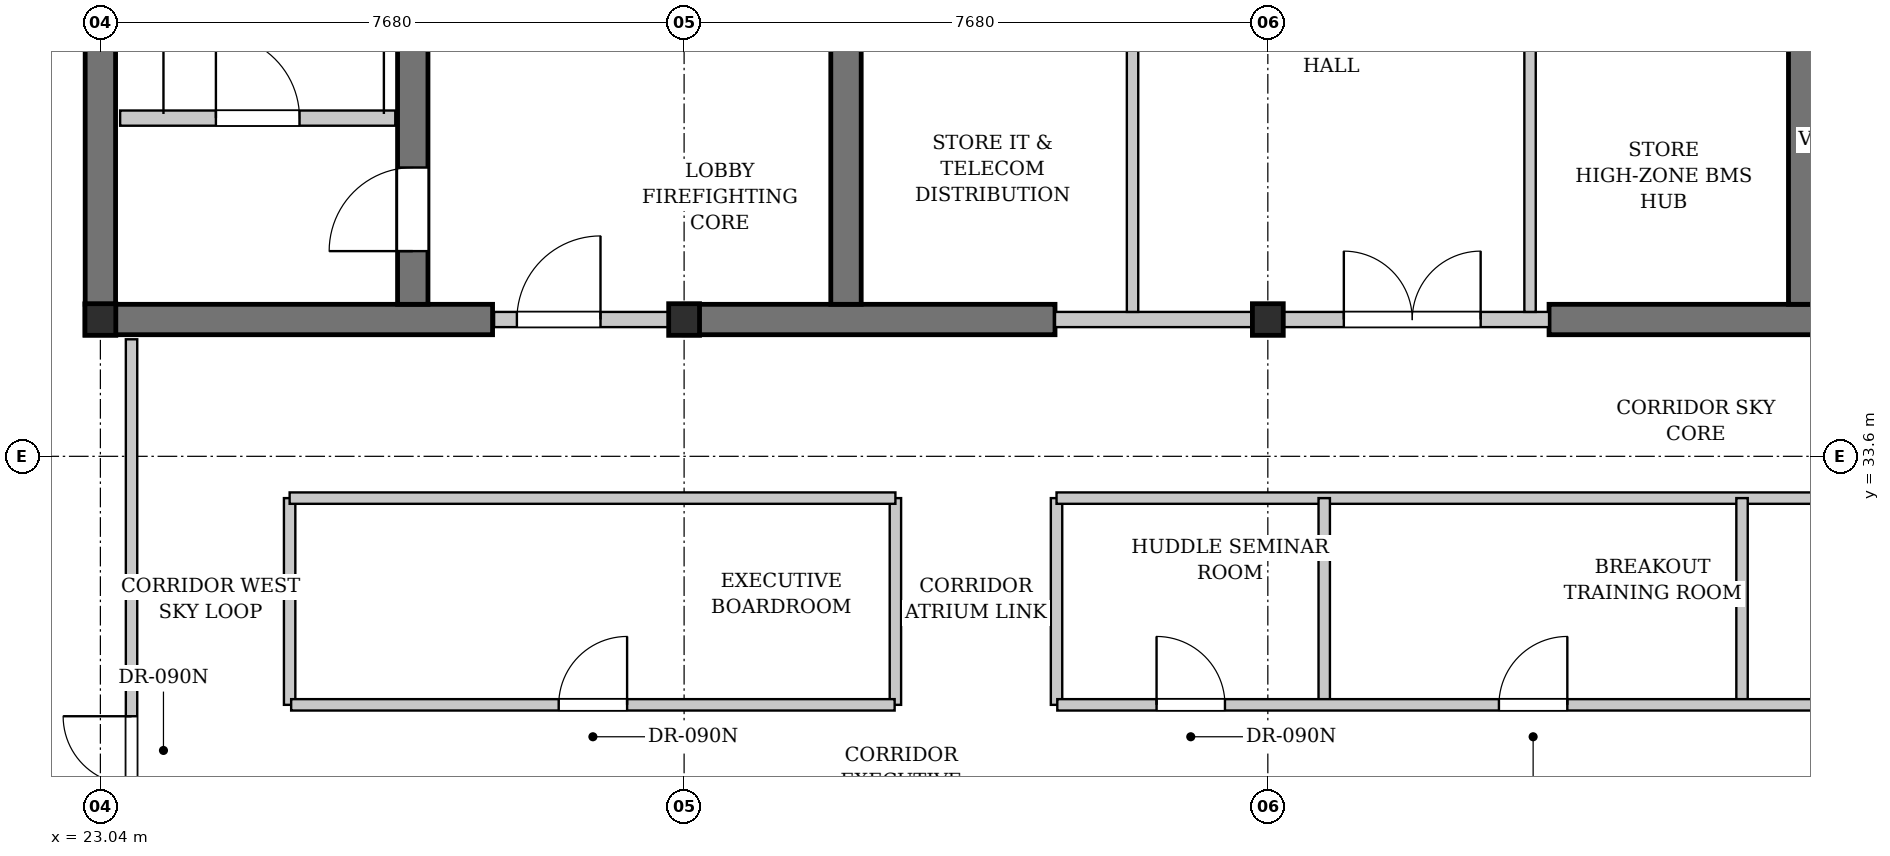
"""IFC4 building model, lengths in metres.
Left out: names, types, materials, properties, quantities, classifications, styles, units other than length and angle.
Written with IfcOpenShell. Run it as: python <this file> out.ifc"""

import sys

from ifc_helpers import new_model, si_unit, direction, frame, frame_2d, origin, origin_2d, place, context, subcontext, project, spatial, rectangle, i_section, extrude, element, fill, save


model = new_model("IFC4")
c1 = context("Model", 3, precision=1e-05, world=origin(), true_north=direction((0.0, 1.0)))
c2 = subcontext(c1, "Body", "Model", "MODEL_VIEW")
j1 = project(units=[si_unit("LENGTHUNIT", "METRE"), si_unit("PLANEANGLEUNIT", "RADIAN")], contexts=[c1])
p1 = place(None, origin())
s1 = spatial("IfcSite", under=j1, at=p1, CompositionType="ELEMENT")
p2 = place(p1, origin())
s2 = spatial("IfcBuilding", under=s1, at=p2, CompositionType="ELEMENT")
p3 = place(p2, frame((0.0, 0.0, 265.9)))
s3 = spatial("IfcBuildingStorey", under=s2, at=p3, CompositionType="ELEMENT", Elevation=265.9)
p4 = place(p3, frame((22.84, 35.4, 0.0), z_axis=(0.0, 0.0, 1.0), x_axis=(1.0, 0.0, 0.0)))
e1 = element("IfcWall", 1, at=p4, inside=s3, PredefinedType="SHEAR", context=c2, shape_type="SweptSolid", body=[
    extrude(rectangle(XDim=5.36, YDim=0.4, at=frame_2d((2.68, 0.0))), origin(), (0.0, 0.0, 1.0), 3.18),
])
p5 = place(p3, frame((30.72, 35.4, 0.0), z_axis=(0.0, 0.0, 1.0), x_axis=(1.0, 0.0, 0.0)))
e2 = element("IfcWall", 2, at=p5, inside=s3, PredefinedType="SHEAR", context=c2, shape_type="SweptSolid", body=[
    extrude(rectangle(XDim=4.88, YDim=0.4, at=frame_2d((2.44, 0.0))), origin(), (0.0, 0.0, 1.0), 3.18),
])
p6 = place(p3, frame((42.1, 35.4, 0.0), z_axis=(0.0, 0.0, 1.0), x_axis=(1.0, 0.0, 0.0)))
e3 = element("IfcWall", 3, at=p6, inside=s3, PredefinedType="SHEAR", context=c2, shape_type="SweptSolid", body=[
    extrude(rectangle(XDim=8.05, YDim=0.4, at=frame_2d((4.025, 0.0))), origin(), (0.0, 0.0, 1.0), 3.18),
])
p7 = place(p6, frame((4.85, 0.0, 0.0)))
e4 = element("IfcOpeningElement", 4, at=p7, cuts=e3, PredefinedType="OPENING", context=c2, shape_type="SweptSolid", body=[
    extrude(rectangle(XDim=0.9, YDim=2.15, at=frame_2d((0.45, 1.075))), frame((0.0, 0.21, 0.0), z_axis=(0.0, -1.0, 0.0), x_axis=(1.0, 0.0, 0.0)), (0.0, 0.0, 1.0), 0.42),
])
p8 = place(p3, frame((23.04, 35.6, 0.0), z_axis=(0.0, 0.0, 1.0), x_axis=(0.0, 1.0, 0.0)))
e5 = element("IfcWall", 5, at=p8, inside=s3, PredefinedType="SHEAR", context=c2, shape_type="SweptSolid", body=[
    extrude(rectangle(XDim=10.4, YDim=0.4, at=frame_2d((5.2, 0.0))), origin(), (0.0, 0.0, 1.0), 3.18),
])
p9 = place(p3, frame((27.15, 35.6, 0.0), z_axis=(0.0, 0.0, 1.0), x_axis=(0.0, 1.0, 0.0)))
e6 = element("IfcWall", 6, at=p9, inside=s3, PredefinedType="SHEAR", context=c2, shape_type="SweptSolid", body=[
    extrude(rectangle(XDim=10.4, YDim=0.4, at=frame_2d((5.2, 0.0))), origin(), (0.0, 0.0, 1.0), 3.18),
])
p10 = place(p9, frame((0.7, 0.0, 0.0)))
e7 = element("IfcOpeningElement", 7, at=p10, cuts=e6, PredefinedType="OPENING", context=c2, shape_type="SweptSolid", body=[
    extrude(rectangle(XDim=1.1, YDim=2.15, at=frame_2d((0.55, 1.075))), frame((0.0, 0.21, 0.0), z_axis=(0.0, -1.0, 0.0), x_axis=(1.0, 0.0, 0.0)), (0.0, 0.0, 1.0), 0.42),
])
for number, where, z_axis, x_axis in (
    (8, (32.85, 35.6, 0.0), (0.0, 0.0, 1.0), (0.0, 1.0, 0.0)),
    (9, (45.45, 35.6, 0.0), (0.0, 0.0, 1.0), (0.0, 1.0, 0.0)),
):
    element("IfcWall", number, at=place(p3, frame(where, z_axis=z_axis, x_axis=x_axis)), inside=s3, PredefinedType="SHEAR", context=c2, shape_type="SweptSolid", body=[
        extrude(rectangle(XDim=10.4, YDim=0.4, at=frame_2d((5.2, 0.0))), origin(), (0.0, 0.0, 1.0), 3.18),
    ])
for number, where, z_axis, x_axis in (
    (10, (23.04, 35.4, 0.0), (0.0, 0.0, 1.0), (1.0, 0.0, 0.0)),
    (11, (30.72, 35.4, 0.0), (0.0, 0.0, 1.0), (1.0, 0.0, 0.0)),
    (12, (38.4, 35.4, 0.0), (0.0, 0.0, 1.0), (1.0, 0.0, 0.0)),
):
    element("IfcColumn", number, at=place(p3, frame(where, z_axis=z_axis, x_axis=x_axis)), inside=s3, PredefinedType="COLUMN", context=c2, shape_type="SweptSolid", body=[
        extrude(i_section(OverallWidth=0.406, OverallDepth=0.416, WebThickness=0.03, FlangeThickness=0.048, FilletRadius=0.015, at=origin_2d()), origin(), (0.0, 0.0, 1.0), 3.4),
    ])
p11 = place(p3, frame((23.3, 38.05, 0.0), z_axis=(0.0, 0.0, 1.0), x_axis=(1.0, 0.0, 0.0)))
e13 = element("IfcWall", 13, at=p11, inside=s3, PredefinedType="PARTITIONING", context=c2, shape_type="SweptSolid", body=[
    extrude(rectangle(XDim=3.62, YDim=0.2, at=frame_2d((1.81, 0.0))), origin(), (0.0, 0.0, 1.0), 3.18),
])
p12 = place(p11, frame((1.26, 0.0, 0.0)))
e14 = element("IfcOpeningElement", 14, at=p12, cuts=e13, PredefinedType="OPENING", context=c2, shape_type="SweptSolid", body=[
    extrude(rectangle(XDim=1.1, YDim=2.15, at=frame_2d((0.55, 1.075))), frame((0.0, 0.11, 0.0), z_axis=(0.0, -1.0, 0.0), x_axis=(1.0, 0.0, 0.0)), (0.0, 0.0, 1.0), 0.22),
])
p13 = place(p3, frame((28.22, 35.4, 0.0), z_axis=(0.0, 0.0, 1.0), x_axis=(1.0, 0.0, 0.0)))
e15 = element("IfcWall", 15, at=p13, inside=s3, PredefinedType="PARTITIONING", context=c2, shape_type="SweptSolid", body=[
    extrude(rectangle(XDim=2.5, YDim=0.2, at=frame_2d((1.25, 0.0))), origin(), (0.0, 0.0, 1.0), 2.575),
])
p14 = place(p13, frame((0.3, 0.0, 0.0)))
e16 = element("IfcOpeningElement", 16, at=p14, cuts=e15, PredefinedType="OPENING", context=c2, shape_type="SweptSolid", body=[
    extrude(rectangle(XDim=1.1, YDim=2.15, at=frame_2d((0.55, 1.075))), frame((0.0, 0.11, 0.0), z_axis=(0.0, -1.0, 0.0), x_axis=(1.0, 0.0, 0.0)), (0.0, 0.0, 1.0), 0.22),
])
p15 = place(p3, frame((35.6, 35.4, 0.0), z_axis=(0.0, 0.0, 1.0), x_axis=(1.0, 0.0, 0.0)))
e17 = element("IfcWall", 17, at=p15, inside=s3, PredefinedType="PARTITIONING", context=c2, shape_type="SweptSolid", body=[
    extrude(rectangle(XDim=6.5, YDim=0.2, at=frame_2d((3.25, 0.0))), origin(), (0.0, 0.0, 1.0), 2.575),
])
p16 = place(p15, frame((3.8, 0.0, 0.0)))
e18 = element("IfcOpeningElement", 18, at=p16, cuts=e17, PredefinedType="OPENING", context=c2, shape_type="SweptSolid", body=[
    extrude(rectangle(XDim=1.8, YDim=2.3, at=frame_2d((0.9, 1.15))), frame((0.0, 0.11, 0.0), z_axis=(0.0, -1.0, 0.0), x_axis=(1.0, 0.0, 0.0)), (0.0, 0.0, 1.0), 0.22),
])
p17 = place(p3, frame((36.62, 35.5, 0.0), z_axis=(0.0, 0.0, 1.0), x_axis=(0.0, 1.0, 0.0)))
e19 = element("IfcWall", 19, at=p17, inside=s3, PredefinedType="PARTITIONING", context=c2, shape_type="SweptSolid", body=[
    extrude(rectangle(XDim=10.42, YDim=0.15, at=frame_2d((5.21, 0.0))), origin(), (0.0, 0.0, 1.0), 3.18),
])
p18 = place(p17, frame((3.92, 0.0, 0.0)))
e20 = element("IfcOpeningElement", 20, at=p18, cuts=e19, PredefinedType="OPENING", context=c2, shape_type="SweptSolid", body=[
    extrude(rectangle(XDim=0.9, YDim=2.15, at=frame_2d((0.45, 1.075))), frame((0.0, 0.085, 0.0), z_axis=(0.0, -1.0, 0.0), x_axis=(1.0, 0.0, 0.0)), (0.0, 0.0, 1.0), 0.17),
])
p19 = place(p17, frame((5.85, 0.0, 0.0)))
e21 = element("IfcOpeningElement", 21, at=p19, cuts=e19, PredefinedType="OPENING", context=c2, shape_type="SweptSolid", body=[
    extrude(rectangle(XDim=0.9, YDim=2.15, at=frame_2d((0.45, 1.075))), frame((0.0, 0.085, 0.0), z_axis=(0.0, -1.0, 0.0), x_axis=(1.0, 0.0, 0.0)), (0.0, 0.0, 1.0), 0.17),
])
p20 = place(p3, frame((41.85, 35.5, 0.0), z_axis=(0.0, 0.0, 1.0), x_axis=(0.0, 1.0, 0.0)))
e22 = element("IfcWall", 22, at=p20, inside=s3, PredefinedType="PARTITIONING", context=c2, shape_type="SweptSolid", body=[
    extrude(rectangle(XDim=10.42, YDim=0.15, at=frame_2d((5.21, 0.0))), origin(), (0.0, 0.0, 1.0), 3.18),
])
p21 = place(p20, frame((3.92, 0.0, 0.0)))
e23 = element("IfcOpeningElement", 23, at=p21, cuts=e22, PredefinedType="OPENING", context=c2, shape_type="SweptSolid", body=[
    extrude(rectangle(XDim=0.9, YDim=2.15, at=frame_2d((0.45, 1.075))), frame((0.0, 0.085, 0.0), z_axis=(0.0, -1.0, 0.0), x_axis=(1.0, 0.0, 0.0)), (0.0, 0.0, 1.0), 0.17),
])
p22 = place(p20, frame((5.85, 0.0, 0.0)))
e24 = element("IfcOpeningElement", 24, at=p22, cuts=e22, PredefinedType="OPENING", context=c2, shape_type="SweptSolid", body=[
    extrude(rectangle(XDim=0.9, YDim=2.15, at=frame_2d((0.45, 1.075))), frame((0.0, 0.085, 0.0), z_axis=(0.0, -1.0, 0.0), x_axis=(1.0, 0.0, 0.0)), (0.0, 0.0, 1.0), 0.17),
])
p23 = place(p3, frame((23.45, 28.25, 0.0), z_axis=(0.0, 0.0, 1.0), x_axis=(0.0, 1.0, 0.0)))
e25 = element("IfcWall", 25, at=p23, inside=s3, PredefinedType="PARTITIONING", context=c2, shape_type="SweptSolid", body=[
    extrude(rectangle(XDim=6.89, YDim=0.15, at=frame_2d((3.445, 0.0))), origin(), (0.0, 0.0, 1.0), 3.18),
])
p24 = place(p23, frame((1.03, 0.0, 0.0)))
e26 = element("IfcOpeningElement", 26, at=p24, cuts=e25, PredefinedType="OPENING", context=c2, shape_type="SweptSolid", body=[
    extrude(rectangle(XDim=0.9, YDim=2.15, at=frame_2d((0.45, 1.075))), frame((0.0, 0.085, 0.0), z_axis=(0.0, -1.0, 0.0), x_axis=(1.0, 0.0, 0.0)), (0.0, 0.0, 1.0), 0.17),
])
for number, where, z_axis, x_axis in (
    (27, (25.53, 30.33, 0.0), (0.0, 0.0, 1.0), (0.0, 1.0, 0.0)),
    (28, (33.5, 30.33, 0.0), (0.0, 0.0, 1.0), (0.0, 1.0, 0.0)),
    (29, (35.62, 30.33, 0.0), (0.0, 0.0, 1.0), (0.0, 1.0, 0.0)),
):
    element("IfcWall", number, at=place(p3, frame(where, z_axis=z_axis, x_axis=x_axis)), inside=s3, PredefinedType="PARTITIONING", context=c2, shape_type="SweptSolid", body=[
        extrude(rectangle(XDim=2.72, YDim=0.15, at=frame_2d((1.36, 0.0))), origin(), (0.0, 0.0, 1.0), 3.18),
    ])
p25 = place(p3, frame((25.53, 33.05, 0.0), z_axis=(0.0, 0.0, 1.0), x_axis=(1.0, 0.0, 0.0)))
e30 = element("IfcWall", 30, at=p25, inside=s3, PredefinedType="PARTITIONING", context=c2, shape_type="SweptSolid", body=[
    extrude(rectangle(XDim=7.97, YDim=0.15, at=frame_2d((3.985, 0.0))), origin(), (0.0, 0.0, 1.0), 3.18),
])
p26 = place(p3, frame((35.62, 33.05, 0.0), z_axis=(0.0, 0.0, 1.0), x_axis=(1.0, 0.0, 0.0)))
e31 = element("IfcWall", 31, at=p26, inside=s3, PredefinedType="PARTITIONING", context=c2, shape_type="SweptSolid", body=[
    extrude(rectangle(XDim=15.3, YDim=0.15, at=frame_2d((7.65, 0.0))), origin(), (0.0, 0.0, 1.0), 3.18),
])
p27 = place(p3, frame((25.55, 30.33, 0.0), z_axis=(0.0, 0.0, 1.0), x_axis=(1.0, 0.0, 0.0)))
e32 = element("IfcWall", 32, at=p27, inside=s3, PredefinedType="PARTITIONING", context=c2, shape_type="SweptSolid", body=[
    extrude(rectangle(XDim=7.94, YDim=0.15, at=frame_2d((3.97, 0.0))), origin(), (0.0, 0.0, 1.0), 3.18),
])
p28 = place(p27, frame((3.52, 0.0, 0.0)))
e33 = element("IfcOpeningElement", 33, at=p28, cuts=e32, PredefinedType="OPENING", context=c2, shape_type="SweptSolid", body=[
    extrude(rectangle(XDim=0.9, YDim=2.15, at=frame_2d((0.45, 1.075))), frame((0.0, 0.085, 0.0), z_axis=(0.0, -1.0, 0.0), x_axis=(1.0, 0.0, 0.0)), (0.0, 0.0, 1.0), 0.17),
])
for number, where, z_axis, x_axis in (
    (34, (39.142, 30.33, 0.0), (0.0, 0.0, 1.0), (0.0, 1.0, 0.0)),
    (35, (44.639, 30.33, 0.0), (0.0, 0.0, 1.0), (0.0, 1.0, 0.0)),
):
    element("IfcWall", number, at=place(p3, frame(where, z_axis=z_axis, x_axis=x_axis)), inside=s3, PredefinedType="PARTITIONING", context=c2, shape_type="SweptSolid", body=[
        extrude(rectangle(XDim=2.72, YDim=0.15, at=frame_2d((1.36, 0.0))), origin(), (0.0, 0.0, 1.0), 3.18),
    ])
p29 = place(p3, frame((35.63, 30.33, 0.0), z_axis=(0.0, 0.0, 1.0), x_axis=(1.0, 0.0, 0.0)))
e36 = element("IfcWall", 36, at=p29, inside=s3, PredefinedType="PARTITIONING", context=c2, shape_type="SweptSolid", body=[
    extrude(rectangle(XDim=15.27, YDim=0.15, at=frame_2d((7.635, 0.0))), origin(), (0.0, 0.0, 1.0), 3.18),
])
p30 = place(p29, frame((1.306, 0.0, 0.0)))
e37 = element("IfcOpeningElement", 37, at=p30, cuts=e36, PredefinedType="OPENING", context=c2, shape_type="SweptSolid", body=[
    extrude(rectangle(XDim=0.9, YDim=2.15, at=frame_2d((0.45, 1.075))), frame((0.0, 0.085, 0.0), z_axis=(0.0, -1.0, 0.0), x_axis=(1.0, 0.0, 0.0)), (0.0, 0.0, 1.0), 0.17),
])
p31 = place(p29, frame((5.811, 0.0, 0.0)))
e38 = element("IfcOpeningElement", 38, at=p31, cuts=e36, PredefinedType="OPENING", context=c2, shape_type="SweptSolid", body=[
    extrude(rectangle(XDim=0.9, YDim=2.15, at=frame_2d((0.45, 1.075))), frame((0.0, 0.085, 0.0), z_axis=(0.0, -1.0, 0.0), x_axis=(1.0, 0.0, 0.0)), (0.0, 0.0, 1.0), 0.17),
])
p32 = place(p29, frame((11.689, 0.0, 0.0)))
e39 = element("IfcOpeningElement", 39, at=p32, cuts=e36, PredefinedType="OPENING", context=c2, shape_type="SweptSolid", body=[
    extrude(rectangle(XDim=0.9, YDim=2.15, at=frame_2d((0.45, 1.075))), frame((0.0, 0.085, 0.0), z_axis=(0.0, -1.0, 0.0), x_axis=(1.0, 0.0, 0.0)), (0.0, 0.0, 1.0), 0.17),
])
p33 = place(p12, origin())
e40 = element("IfcDoor", 40, at=p33, inside=s3, OperationType="SINGLE_SWING_LEFT", PredefinedType="DOOR", context=c2, shape_type="SweptSolid", body=[
    extrude(rectangle(XDim=1.1, YDim=2.15, at=frame_2d((0.55, 1.075))), frame((0.0, 0.025, 0.0), z_axis=(0.0, -1.0, 0.0), x_axis=(1.0, 0.0, 0.0)), (0.0, 0.0, 1.0), 0.05),
])
fill(e14, e40)
p34 = place(p14, origin())
e41 = element("IfcDoor", 41, at=p34, inside=s3, OperationType="SINGLE_SWING_RIGHT", PredefinedType="DOOR", context=c2, shape_type="SweptSolid", body=[
    extrude(rectangle(XDim=1.1, YDim=2.15, at=frame_2d((0.55, 1.075))), frame((0.0, 0.025, 0.0), z_axis=(0.0, -1.0, 0.0), x_axis=(1.0, 0.0, 0.0)), (0.0, 0.0, 1.0), 0.05),
])
fill(e16, e41)
p35 = place(p16, origin())
e42 = element("IfcDoor", 42, at=p35, inside=s3, OperationType="DOUBLE_DOOR_SINGLE_SWING", PredefinedType="DOOR", context=c2, shape_type="SweptSolid", body=[
    extrude(rectangle(XDim=1.8, YDim=2.3, at=frame_2d((0.9, 1.15))), frame((0.0, 0.025, 0.0), z_axis=(0.0, -1.0, 0.0), x_axis=(1.0, 0.0, 0.0)), (0.0, 0.0, 1.0), 0.05),
])
fill(e18, e42)
p36 = place(p24, origin())
e43 = element("IfcDoor", 43, at=p36, inside=s3, OperationType="SINGLE_SWING_RIGHT", PredefinedType="DOOR", context=c2, shape_type="SweptSolid", body=[
    extrude(rectangle(XDim=0.9, YDim=2.15, at=frame_2d((0.45, 1.075))), frame((0.0, 0.025, 0.0), z_axis=(0.0, -1.0, 0.0), x_axis=(1.0, 0.0, 0.0)), (0.0, 0.0, 1.0), 0.05),
])
fill(e26, e43)
p37 = place(p28, origin())
e44 = element("IfcDoor", 44, at=p37, inside=s3, OperationType="SINGLE_SWING_RIGHT", PredefinedType="DOOR", context=c2, shape_type="SweptSolid", body=[
    extrude(rectangle(XDim=0.9, YDim=2.15, at=frame_2d((0.45, 1.075))), frame((0.0, 0.025, 0.0), z_axis=(0.0, -1.0, 0.0), x_axis=(1.0, 0.0, 0.0)), (0.0, 0.0, 1.0), 0.05),
])
fill(e33, e44)
p38 = place(p30, origin())
e45 = element("IfcDoor", 45, at=p38, inside=s3, OperationType="SINGLE_SWING_LEFT", PredefinedType="DOOR", context=c2, shape_type="SweptSolid", body=[
    extrude(rectangle(XDim=0.9, YDim=2.15, at=frame_2d((0.45, 1.075))), frame((0.0, 0.025, 0.0), z_axis=(0.0, -1.0, 0.0), x_axis=(1.0, 0.0, 0.0)), (0.0, 0.0, 1.0), 0.05),
])
fill(e37, e45)
p39 = place(p31, origin())
e46 = element("IfcDoor", 46, at=p39, inside=s3, OperationType="SINGLE_SWING_RIGHT", PredefinedType="DOOR", context=c2, shape_type="SweptSolid", body=[
    extrude(rectangle(XDim=0.9, YDim=2.15, at=frame_2d((0.45, 1.075))), frame((0.0, 0.025, 0.0), z_axis=(0.0, -1.0, 0.0), x_axis=(1.0, 0.0, 0.0)), (0.0, 0.0, 1.0), 0.05),
])
fill(e38, e46)
p40 = place(p10, origin())
e47 = element("IfcDoor", 47, at=p40, inside=s3, OperationType="SINGLE_SWING_LEFT", PredefinedType="DOOR", context=c2, shape_type="SweptSolid", body=[
    extrude(rectangle(XDim=1.1, YDim=2.15, at=frame_2d((0.55, 1.075))), frame((0.0, 0.025, 0.0), z_axis=(0.0, -1.0, 0.0), x_axis=(1.0, 0.0, 0.0)), (0.0, 0.0, 1.0), 0.05),
])
fill(e7, e47)
save(model, sys.argv[1])
